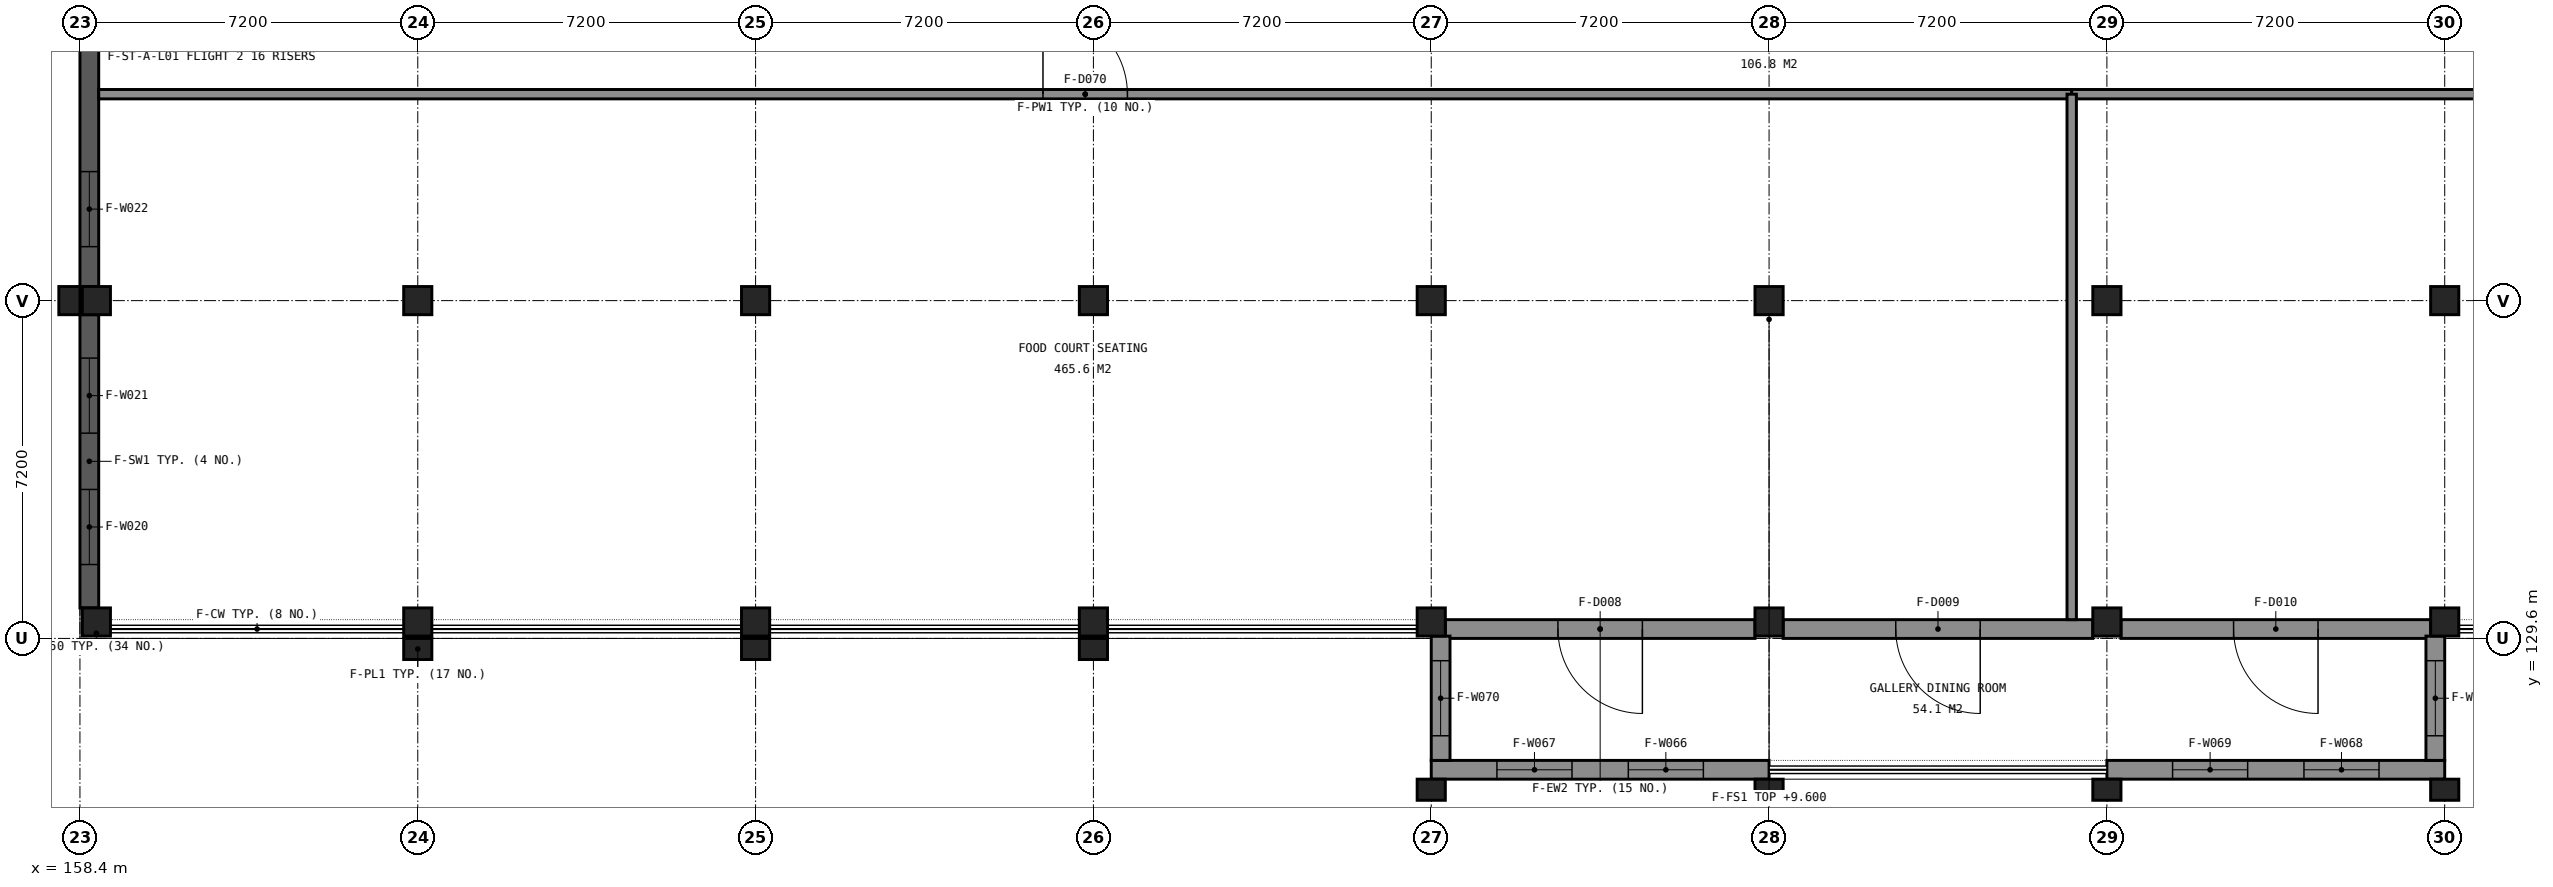
"""IFC4 building model, lengths in metres.
Left out: names, types, materials, properties, quantities, classifications, styles, units other than length and angle.
Written with IfcOpenShell. Run it as: python <this file> out.ifc"""

import sys

from ifc_helpers import new_model, si_unit, direction, frame, frame_2d, origin, origin_2d, place, context, subcontext, project, spatial, rectangle, extrude, element, fill, save


model = new_model("IFC4")
c1 = context("Model", 3, precision=1e-05, world=origin(), true_north=direction((0.0, 1.0)))
c2 = subcontext(c1, "Body", "Model", "MODEL_VIEW")
j1 = project(units=[si_unit("LENGTHUNIT", "METRE"), si_unit("PLANEANGLEUNIT", "RADIAN")], contexts=[c1])
p1 = place(None, origin())
s1 = spatial("IfcSite", under=j1, at=p1, CompositionType="ELEMENT")
p2 = place(p1, origin())
s2 = spatial("IfcBuilding", under=s1, at=p2, CompositionType="ELEMENT")
p3 = place(p2, frame((0.0, 0.0, 9.6)))
s3 = spatial("IfcBuildingStorey", under=s2, at=p3, CompositionType="ELEMENT", Elevation=9.6)
for number, where, z_axis, x_axis in (
    (1, (158.75, 129.95, 0.0), (0.0, 0.0, 1.0), (1.0, 0.0, 0.0)),
    (2, (165.6, 129.95, 0.0), (0.0, 0.0, 1.0), (1.0, 0.0, 0.0)),
    (3, (172.8, 129.95, 0.0), (0.0, 0.0, 1.0), (1.0, 0.0, 0.0)),
    (4, (180.0, 129.95, 0.0), (0.0, 0.0, 1.0), (1.0, 0.0, 0.0)),
    (5, (187.2, 129.95, 0.0), (0.0, 0.0, 1.0), (1.0, 0.0, 0.0)),
    (6, (194.4, 129.95, 0.0), (0.0, 0.0, 1.0), (1.0, 0.0, 0.0)),
    (7, (201.6, 129.95, 0.0), (0.0, 0.0, 1.0), (1.0, 0.0, 0.0)),
    (8, (208.8, 129.95, 0.0), (0.0, 0.0, 1.0), (1.0, 0.0, 0.0)),
    (9, (158.75, 136.8, 0.0), (0.0, 0.0, 1.0), (1.0, 0.0, 0.0)),
    (10, (165.6, 136.8, 0.0), (0.0, 0.0, 1.0), (1.0, 0.0, 0.0)),
    (11, (172.8, 136.8, 0.0), (0.0, 0.0, 1.0), (1.0, 0.0, 0.0)),
    (12, (180.0, 136.8, 0.0), (0.0, 0.0, 1.0), (1.0, 0.0, 0.0)),
    (13, (187.2, 136.8, 0.0), (0.0, 0.0, 1.0), (1.0, 0.0, 0.0)),
    (14, (194.4, 136.8, 0.0), (0.0, 0.0, 1.0), (1.0, 0.0, 0.0)),
    (15, (201.6, 136.8, 0.0), (0.0, 0.0, 1.0), (1.0, 0.0, 0.0)),
    (16, (208.8, 136.8, 0.0), (0.0, 0.0, 1.0), (1.0, 0.0, 0.0)),
):
    element("IfcColumn", number, at=place(p3, frame(where, z_axis=z_axis, x_axis=x_axis)), inside=s3, PredefinedType="COLUMN", context=c2, shape_type="SweptSolid", body=[
        extrude(rectangle(XDim=0.6, YDim=0.6, at=origin_2d()), origin(), (0.0, 0.0, 1.0), 4.8),
    ])
p4 = place(p3, frame((194.1, 129.8, 0.0), z_axis=(0.0, 0.0, 1.0), x_axis=(-1.0, 0.0, 0.0)))
e17 = element("IfcWall", 17, at=p4, inside=s3, PredefinedType="SOLIDWALL", context=c2, shape_type="SweptSolid", body=[
    extrude(rectangle(XDim=6.6, YDim=0.4, at=frame_2d((3.3, 0.0))), origin(), (0.0, 0.0, 1.0), 3.95),
])
p5 = place(p4, frame((2.4, 0.0, 0.0)))
e18 = element("IfcOpeningElement", 18, at=p5, cuts=e17, PredefinedType="OPENING", context=c2, shape_type="SweptSolid", body=[
    extrude(rectangle(XDim=1.8, YDim=2.1, at=frame_2d((0.9, 1.05))), frame((0.0, 0.21, 0.0), z_axis=(0.0, -1.0, 0.0), x_axis=(1.0, 0.0, 0.0)), (0.0, 0.0, 1.0), 0.42),
])
p6 = place(p3, frame((201.3, 129.8, 0.0), z_axis=(0.0, 0.0, 1.0), x_axis=(-1.0, 0.0, 0.0)))
e19 = element("IfcWall", 19, at=p6, inside=s3, PredefinedType="SOLIDWALL", context=c2, shape_type="SweptSolid", body=[
    extrude(rectangle(XDim=6.6, YDim=0.4, at=frame_2d((3.3, 0.0))), origin(), (0.0, 0.0, 1.0), 3.95),
])
p7 = place(p6, frame((2.4, 0.0, 0.0)))
e20 = element("IfcOpeningElement", 20, at=p7, cuts=e19, PredefinedType="OPENING", context=c2, shape_type="SweptSolid", body=[
    extrude(rectangle(XDim=1.8, YDim=2.1, at=frame_2d((0.9, 1.05))), frame((0.0, 0.21, 0.0), z_axis=(0.0, -1.0, 0.0), x_axis=(1.0, 0.0, 0.0)), (0.0, 0.0, 1.0), 0.42),
])
p8 = place(p3, frame((208.5, 129.8, 0.0), z_axis=(0.0, 0.0, 1.0), x_axis=(-1.0, 0.0, 0.0)))
e21 = element("IfcWall", 21, at=p8, inside=s3, PredefinedType="SOLIDWALL", context=c2, shape_type="SweptSolid", body=[
    extrude(rectangle(XDim=6.6, YDim=0.4, at=frame_2d((3.3, 0.0))), origin(), (0.0, 0.0, 1.0), 3.95),
])
p9 = place(p8, frame((2.4, 0.0, 0.0)))
e22 = element("IfcOpeningElement", 22, at=p9, cuts=e21, PredefinedType="OPENING", context=c2, shape_type="SweptSolid", body=[
    extrude(rectangle(XDim=1.8, YDim=2.1, at=frame_2d((0.9, 1.05))), frame((0.0, 0.21, 0.0), z_axis=(0.0, -1.0, 0.0), x_axis=(1.0, 0.0, 0.0)), (0.0, 0.0, 1.0), 0.42),
])
p10 = place(p3, frame((158.6, 130.25, 0.0), z_axis=(0.0, 0.0, 1.0), x_axis=(0.0, 1.0, 0.0)))
e23 = element("IfcWall", 23, at=p10, inside=s3, PredefinedType="SHEAR", context=c2, shape_type="SweptSolid", body=[
    extrude(rectangle(XDim=6.25, YDim=0.4, at=frame_2d((3.125, 0.0))), origin(), (0.0, 0.0, 1.0), 3.95),
])
p11 = place(p10, frame((0.925, 0.0, 0.8)))
e24 = element("IfcOpeningElement", 24, at=p11, cuts=e23, PredefinedType="OPENING", context=c2, shape_type="SweptSolid", body=[
    extrude(rectangle(XDim=1.6, YDim=3.1, at=frame_2d((0.8, 1.55))), frame((0.0, 0.21, 0.0), z_axis=(0.0, -1.0, 0.0), x_axis=(1.0, 0.0, 0.0)), (0.0, 0.0, 1.0), 0.42),
])
p12 = place(p10, frame((3.725, 0.0, 0.8)))
e25 = element("IfcOpeningElement", 25, at=p12, cuts=e23, PredefinedType="OPENING", context=c2, shape_type="SweptSolid", body=[
    extrude(rectangle(XDim=1.6, YDim=3.1, at=frame_2d((0.8, 1.55))), frame((0.0, 0.21, 0.0), z_axis=(0.0, -1.0, 0.0), x_axis=(1.0, 0.0, 0.0)), (0.0, 0.0, 1.0), 0.42),
])
p13 = place(p3, frame((158.6, 137.1, 0.0), z_axis=(0.0, 0.0, 1.0), x_axis=(0.0, 1.0, 0.0)))
e26 = element("IfcWall", 26, at=p13, inside=s3, PredefinedType="SHEAR", context=c2, shape_type="SweptSolid", body=[
    extrude(rectangle(XDim=6.1, YDim=0.4, at=frame_2d((3.05, 0.0))), origin(), (0.0, 0.0, 1.0), 3.95),
])
p14 = place(p13, frame((0.85, 0.0, 0.8)))
e27 = element("IfcOpeningElement", 27, at=p14, cuts=e26, PredefinedType="OPENING", context=c2, shape_type="SweptSolid", body=[
    extrude(rectangle(XDim=1.6, YDim=3.1, at=frame_2d((0.8, 1.55))), frame((0.0, 0.21, 0.0), z_axis=(0.0, -1.0, 0.0), x_axis=(1.0, 0.0, 0.0)), (0.0, 0.0, 1.0), 0.42),
])
for number, where, z_axis, x_axis in (
    (28, (165.6, 129.375, 0.0), (0.0, 0.0, 1.0), (1.0, 0.0, 0.0)),
    (29, (172.8, 129.375, 0.0), (0.0, 0.0, 1.0), (1.0, 0.0, 0.0)),
    (30, (180.0, 129.375, 0.0), (0.0, 0.0, 1.0), (1.0, 0.0, 0.0)),
    (31, (158.175, 136.8, 0.0), (0.0, 0.0, 1.0), (0.0, 1.0, 0.0)),
):
    element("IfcColumn", number, at=place(p3, frame(where, z_axis=z_axis, x_axis=x_axis)), inside=s3, PredefinedType="PILASTER", context=c2, shape_type="SweptSolid", body=[
        extrude(rectangle(XDim=0.6, YDim=0.45, at=origin_2d()), origin(), (0.0, 0.0, 1.0), 4.8),
    ])
p15 = place(p3, frame((194.4, 126.8, 0.0), z_axis=(0.0, 0.0, 1.0), x_axis=(-1.0, 0.0, 0.0)))
e32 = element("IfcWall", 32, at=p15, inside=s3, PredefinedType="SOLIDWALL", context=c2, shape_type="SweptSolid", body=[
    extrude(rectangle(XDim=7.2, YDim=0.4, at=frame_2d((3.6, 0.0))), origin(), (0.0, 0.0, 1.0), 4.55),
])
p16 = place(p15, frame((1.4, 0.0, 0.8)))
e33 = element("IfcOpeningElement", 33, at=p16, cuts=e32, PredefinedType="OPENING", context=c2, shape_type="SweptSolid", body=[
    extrude(rectangle(XDim=1.6, YDim=3.1, at=frame_2d((0.8, 1.55))), frame((0.0, 0.21, 0.0), z_axis=(0.0, -1.0, 0.0), x_axis=(1.0, 0.0, 0.0)), (0.0, 0.0, 1.0), 0.42),
])
p17 = place(p15, frame((4.2, 0.0, 0.8)))
e34 = element("IfcOpeningElement", 34, at=p17, cuts=e32, PredefinedType="OPENING", context=c2, shape_type="SweptSolid", body=[
    extrude(rectangle(XDim=1.6, YDim=3.1, at=frame_2d((0.8, 1.55))), frame((0.0, 0.21, 0.0), z_axis=(0.0, -1.0, 0.0), x_axis=(1.0, 0.0, 0.0)), (0.0, 0.0, 1.0), 0.42),
])
p18 = place(p3, frame((208.8, 126.8, 0.0), z_axis=(0.0, 0.0, 1.0), x_axis=(-1.0, 0.0, 0.0)))
e35 = element("IfcWall", 35, at=p18, inside=s3, PredefinedType="SOLIDWALL", context=c2, shape_type="SweptSolid", body=[
    extrude(rectangle(XDim=7.2, YDim=0.4, at=frame_2d((3.6, 0.0))), origin(), (0.0, 0.0, 1.0), 4.55),
])
p19 = place(p18, frame((1.4, 0.0, 0.8)))
e36 = element("IfcOpeningElement", 36, at=p19, cuts=e35, PredefinedType="OPENING", context=c2, shape_type="SweptSolid", body=[
    extrude(rectangle(XDim=1.6, YDim=3.1, at=frame_2d((0.8, 1.55))), frame((0.0, 0.21, 0.0), z_axis=(0.0, -1.0, 0.0), x_axis=(1.0, 0.0, 0.0)), (0.0, 0.0, 1.0), 0.42),
])
p20 = place(p18, frame((4.2, 0.0, 0.8)))
e37 = element("IfcOpeningElement", 37, at=p20, cuts=e35, PredefinedType="OPENING", context=c2, shape_type="SweptSolid", body=[
    extrude(rectangle(XDim=1.6, YDim=3.1, at=frame_2d((0.8, 1.55))), frame((0.0, 0.21, 0.0), z_axis=(0.0, -1.0, 0.0), x_axis=(1.0, 0.0, 0.0)), (0.0, 0.0, 1.0), 0.42),
])
p21 = place(p3, frame((187.4, 127.0, 0.0), z_axis=(0.0, 0.0, 1.0), x_axis=(0.0, 1.0, 0.0)))
e38 = element("IfcWall", 38, at=p21, inside=s3, PredefinedType="SOLIDWALL", context=c2, shape_type="SweptSolid", body=[
    extrude(rectangle(XDim=2.65, YDim=0.4, at=frame_2d((1.325, 0.0))), origin(), (0.0, 0.0, 1.0), 4.55),
])
p22 = place(p21, frame((0.525, 0.0, 0.8)))
e39 = element("IfcOpeningElement", 39, at=p22, cuts=e38, PredefinedType="OPENING", context=c2, shape_type="SweptSolid", body=[
    extrude(rectangle(XDim=1.6, YDim=3.1, at=frame_2d((0.8, 1.55))), frame((0.0, 0.21, 0.0), z_axis=(0.0, -1.0, 0.0), x_axis=(1.0, 0.0, 0.0)), (0.0, 0.0, 1.0), 0.42),
])
p23 = place(p3, frame((208.6, 129.65, 0.0), z_axis=(0.0, 0.0, 1.0), x_axis=(0.0, -1.0, 0.0)))
e40 = element("IfcWall", 40, at=p23, inside=s3, PredefinedType="SOLIDWALL", context=c2, shape_type="SweptSolid", body=[
    extrude(rectangle(XDim=2.65, YDim=0.4, at=frame_2d((1.325, 0.0))), origin(), (0.0, 0.0, 1.0), 4.55),
])
p24 = place(p23, frame((0.525, 0.0, 0.8)))
e41 = element("IfcOpeningElement", 41, at=p24, cuts=e40, PredefinedType="OPENING", context=c2, shape_type="SweptSolid", body=[
    extrude(rectangle(XDim=1.6, YDim=3.1, at=frame_2d((0.8, 1.55))), frame((0.0, 0.21, 0.0), z_axis=(0.0, -1.0, 0.0), x_axis=(1.0, 0.0, 0.0)), (0.0, 0.0, 1.0), 0.42),
])
for number, where, z_axis, x_axis in (
    (42, (187.2, 126.375, 0.0), (0.0, 0.0, 1.0), (1.0, 0.0, 0.0)),
    (43, (194.4, 126.375, 0.0), (0.0, 0.0, 1.0), (1.0, 0.0, 0.0)),
    (44, (201.6, 126.375, 0.0), (0.0, 0.0, 1.0), (1.0, 0.0, 0.0)),
    (45, (208.8, 126.375, 0.0), (0.0, 0.0, 1.0), (1.0, 0.0, 0.0)),
):
    element("IfcColumn", number, at=place(p3, frame(where, z_axis=z_axis, x_axis=x_axis)), inside=s3, PredefinedType="PILASTER", context=c2, shape_type="SweptSolid", body=[
        extrude(rectangle(XDim=0.6, YDim=0.45, at=origin_2d()), origin(), (0.0, 0.0, 1.0), 4.8),
    ])
p25 = place(p3, frame((158.8, 141.2, 0.0), z_axis=(0.0, 0.0, 1.0), x_axis=(1.0, 0.0, 0.0)))
e46 = element("IfcWall", 46, at=p25, inside=s3, PredefinedType="PARTITIONING", context=c2, shape_type="SweptSolid", body=[
    extrude(rectangle(XDim=42.05, YDim=0.2, at=frame_2d((21.025, 0.0))), origin(), (0.0, 0.0, 1.0), 3.95),
])
p26 = place(p25, frame((20.125, 0.0, 0.0)))
e47 = element("IfcOpeningElement", 47, at=p26, cuts=e46, PredefinedType="OPENING", context=c2, shape_type="SweptSolid", body=[
    extrude(rectangle(XDim=1.8, YDim=2.1, at=frame_2d((0.9, 1.05))), frame((0.0, 0.11, 0.0), z_axis=(0.0, -1.0, 0.0), x_axis=(1.0, 0.0, 0.0)), (0.0, 0.0, 1.0), 0.22),
])
p27 = place(p3, frame((200.85, 141.2, 0.0), z_axis=(0.0, 0.0, 1.0), x_axis=(1.0, 0.0, 0.0)))
e48 = element("IfcWall", 48, at=p27, inside=s3, PredefinedType="PARTITIONING", context=c2, shape_type="SweptSolid", body=[
    extrude(rectangle(XDim=29.15, YDim=0.2, at=frame_2d((14.575, 0.0))), origin(), (0.0, 0.0, 1.0), 3.95),
])
p28 = place(p27, frame((13.675, 0.0, 0.0)))
e49 = element("IfcOpeningElement", 49, at=p28, cuts=e48, PredefinedType="OPENING", context=c2, shape_type="SweptSolid", body=[
    extrude(rectangle(XDim=1.8, YDim=2.1, at=frame_2d((0.9, 1.05))), frame((0.0, 0.11, 0.0), z_axis=(0.0, -1.0, 0.0), x_axis=(1.0, 0.0, 0.0)), (0.0, 0.0, 1.0), 0.22),
])
p29 = place(p3, frame((200.85, 130.0, 0.0), z_axis=(0.0, 0.0, 1.0), x_axis=(0.0, 1.0, 0.0)))
e50 = element("IfcWall", 50, at=p29, inside=s3, PredefinedType="PARTITIONING", context=c2, shape_type="SweptSolid", body=[
    extrude(rectangle(XDim=11.2, YDim=0.2, at=frame_2d((5.6, 0.0))), origin(), (0.0, 0.0, 1.0), 3.95),
])
p30 = place(p5, origin())
e51 = element("IfcDoor", 51, at=p30, inside=s3, OperationType="NOTDEFINED", PredefinedType="DOOR", context=c2, shape_type="SweptSolid", body=[
    extrude(rectangle(XDim=1.8, YDim=2.1, at=frame_2d((0.9, 1.05))), frame((0.0, 0.025, 0.0), z_axis=(0.0, -1.0, 0.0), x_axis=(1.0, 0.0, 0.0)), (0.0, 0.0, 1.0), 0.05),
])
fill(e18, e51)
p31 = place(p7, origin())
e52 = element("IfcDoor", 52, at=p31, inside=s3, OperationType="NOTDEFINED", PredefinedType="DOOR", context=c2, shape_type="SweptSolid", body=[
    extrude(rectangle(XDim=1.8, YDim=2.1, at=frame_2d((0.9, 1.05))), frame((0.0, 0.025, 0.0), z_axis=(0.0, -1.0, 0.0), x_axis=(1.0, 0.0, 0.0)), (0.0, 0.0, 1.0), 0.05),
])
fill(e20, e52)
p32 = place(p9, origin())
e53 = element("IfcDoor", 53, at=p32, inside=s3, OperationType="NOTDEFINED", PredefinedType="DOOR", context=c2, shape_type="SweptSolid", body=[
    extrude(rectangle(XDim=1.8, YDim=2.1, at=frame_2d((0.9, 1.05))), frame((0.0, 0.025, 0.0), z_axis=(0.0, -1.0, 0.0), x_axis=(1.0, 0.0, 0.0)), (0.0, 0.0, 1.0), 0.05),
])
fill(e22, e53)
p33 = place(p11, origin())
e54 = element("IfcWindow", 54, at=p33, inside=s3, PartitioningType="SINGLE_PANEL", PredefinedType="WINDOW", context=c2, shape_type="SweptSolid", body=[
    extrude(rectangle(XDim=1.6, YDim=3.1, at=frame_2d((0.8, 1.55))), frame((0.0, -0.09, 0.0), z_axis=(0.0, -1.0, 0.0), x_axis=(1.0, 0.0, 0.0)), (0.0, 0.0, 1.0), 0.06),
])
fill(e24, e54)
p34 = place(p12, origin())
e55 = element("IfcWindow", 55, at=p34, inside=s3, PartitioningType="SINGLE_PANEL", PredefinedType="WINDOW", context=c2, shape_type="SweptSolid", body=[
    extrude(rectangle(XDim=1.6, YDim=3.1, at=frame_2d((0.8, 1.55))), frame((0.0, -0.09, 0.0), z_axis=(0.0, -1.0, 0.0), x_axis=(1.0, 0.0, 0.0)), (0.0, 0.0, 1.0), 0.06),
])
fill(e25, e55)
p35 = place(p14, origin())
e56 = element("IfcWindow", 56, at=p35, inside=s3, PartitioningType="SINGLE_PANEL", PredefinedType="WINDOW", context=c2, shape_type="SweptSolid", body=[
    extrude(rectangle(XDim=1.6, YDim=3.1, at=frame_2d((0.8, 1.55))), frame((0.0, -0.09, 0.0), z_axis=(0.0, -1.0, 0.0), x_axis=(1.0, 0.0, 0.0)), (0.0, 0.0, 1.0), 0.06),
])
fill(e27, e56)
p36 = place(p16, origin())
e57 = element("IfcWindow", 57, at=p36, inside=s3, PartitioningType="SINGLE_PANEL", PredefinedType="WINDOW", context=c2, shape_type="SweptSolid", body=[
    extrude(rectangle(XDim=1.6, YDim=3.1, at=frame_2d((0.8, 1.55))), frame((0.0, -0.09, 0.0), z_axis=(0.0, -1.0, 0.0), x_axis=(1.0, 0.0, 0.0)), (0.0, 0.0, 1.0), 0.06),
])
fill(e33, e57)
p37 = place(p17, origin())
e58 = element("IfcWindow", 58, at=p37, inside=s3, PartitioningType="SINGLE_PANEL", PredefinedType="WINDOW", context=c2, shape_type="SweptSolid", body=[
    extrude(rectangle(XDim=1.6, YDim=3.1, at=frame_2d((0.8, 1.55))), frame((0.0, -0.09, 0.0), z_axis=(0.0, -1.0, 0.0), x_axis=(1.0, 0.0, 0.0)), (0.0, 0.0, 1.0), 0.06),
])
fill(e34, e58)
p38 = place(p19, origin())
e59 = element("IfcWindow", 59, at=p38, inside=s3, PartitioningType="SINGLE_PANEL", PredefinedType="WINDOW", context=c2, shape_type="SweptSolid", body=[
    extrude(rectangle(XDim=1.6, YDim=3.1, at=frame_2d((0.8, 1.55))), frame((0.0, -0.09, 0.0), z_axis=(0.0, -1.0, 0.0), x_axis=(1.0, 0.0, 0.0)), (0.0, 0.0, 1.0), 0.06),
])
fill(e36, e59)
p39 = place(p20, origin())
e60 = element("IfcWindow", 60, at=p39, inside=s3, PartitioningType="SINGLE_PANEL", PredefinedType="WINDOW", context=c2, shape_type="SweptSolid", body=[
    extrude(rectangle(XDim=1.6, YDim=3.1, at=frame_2d((0.8, 1.55))), frame((0.0, -0.09, 0.0), z_axis=(0.0, -1.0, 0.0), x_axis=(1.0, 0.0, 0.0)), (0.0, 0.0, 1.0), 0.06),
])
fill(e37, e60)
p40 = place(p22, origin())
e61 = element("IfcWindow", 61, at=p40, inside=s3, PartitioningType="SINGLE_PANEL", PredefinedType="WINDOW", context=c2, shape_type="SweptSolid", body=[
    extrude(rectangle(XDim=1.6, YDim=3.1, at=frame_2d((0.8, 1.55))), frame((0.0, -0.09, 0.0), z_axis=(0.0, -1.0, 0.0), x_axis=(1.0, 0.0, 0.0)), (0.0, 0.0, 1.0), 0.06),
])
fill(e39, e61)
p41 = place(p24, origin())
e62 = element("IfcWindow", 62, at=p41, inside=s3, PartitioningType="SINGLE_PANEL", PredefinedType="WINDOW", context=c2, shape_type="SweptSolid", body=[
    extrude(rectangle(XDim=1.6, YDim=3.1, at=frame_2d((0.8, 1.55))), frame((0.0, -0.09, 0.0), z_axis=(0.0, -1.0, 0.0), x_axis=(1.0, 0.0, 0.0)), (0.0, 0.0, 1.0), 0.06),
])
fill(e41, e62)
p42 = place(p26, origin())
e63 = element("IfcDoor", 63, at=p42, inside=s3, OperationType="NOTDEFINED", PredefinedType="DOOR", context=c2, shape_type="SweptSolid", body=[
    extrude(rectangle(XDim=1.8, YDim=2.1, at=frame_2d((0.9, 1.05))), frame((0.0, 0.025, 0.0), z_axis=(0.0, -1.0, 0.0), x_axis=(1.0, 0.0, 0.0)), (0.0, 0.0, 1.0), 0.05),
])
fill(e47, e63)
save(model, sys.argv[1])
